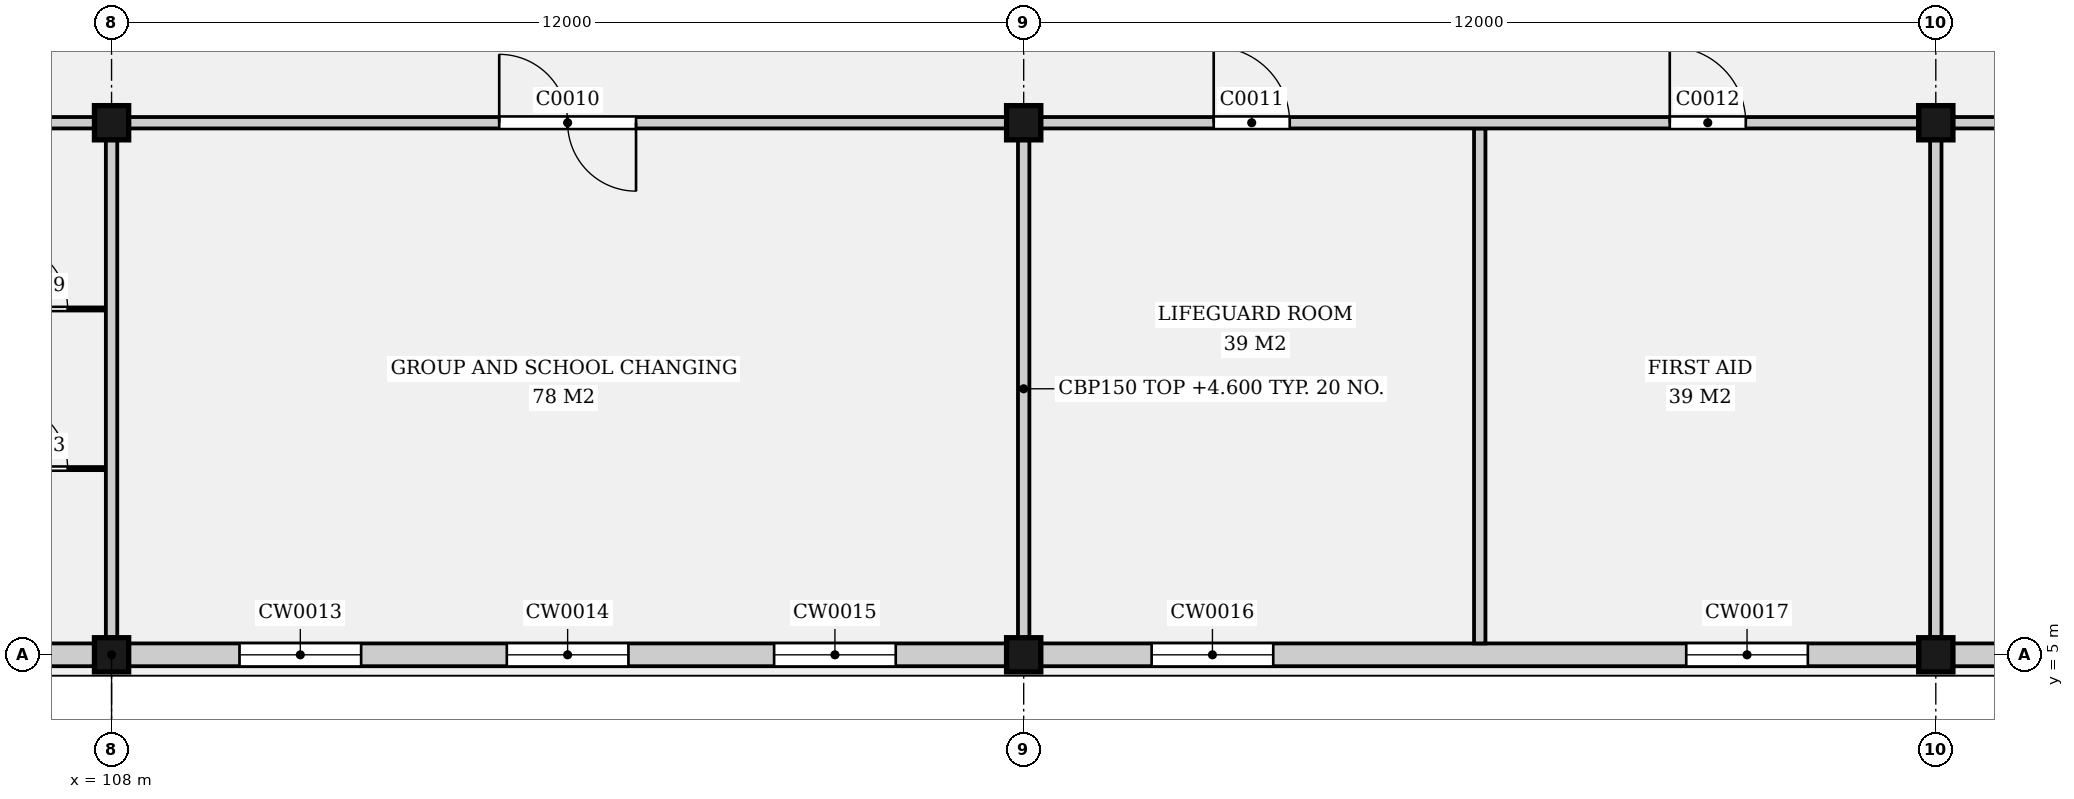
"""IFC4 building model, lengths in metres.
Left out: names, types, materials, properties, quantities, classifications, styles, units other than length and angle.
Written with IfcOpenShell. Run it as: python <this file> out.ifc"""

import sys

from ifc_helpers import new_model, si_unit, direction, frame, frame_2d, origin, origin_2d, place, context, subcontext, project, spatial, rectangle, extrude, element, fill, save


model = new_model("IFC4")
c1 = context("Model", 3, precision=1e-05, world=origin(), true_north=direction((0.0, 1.0)))
c2 = subcontext(c1, "Body", "Model", "MODEL_VIEW")
j1 = project(units=[si_unit("LENGTHUNIT", "METRE"), si_unit("PLANEANGLEUNIT", "RADIAN")], contexts=[c1])
p1 = place(None, origin())
s1 = spatial("IfcSite", under=j1, at=p1, CompositionType="ELEMENT")
p2 = place(p1, origin())
s2 = spatial("IfcBuilding", under=s1, at=p2, CompositionType="ELEMENT")
p3 = place(p2, origin())
s3 = spatial("IfcBuildingStorey", under=s2, at=p3, CompositionType="ELEMENT", Elevation=0.0)
for number, where, z_axis, x_axis in (
    (1, (108.0, 5.0, -0.25), (0.0, 0.0, 1.0), (1.0, 0.0, 0.0)),
    (2, (108.0, 12.0, -0.25), (0.0, 0.0, 1.0), (1.0, 0.0, 0.0)),
    (3, (120.0, 5.0, -0.25), (0.0, 0.0, 1.0), (1.0, 0.0, 0.0)),
    (4, (120.0, 12.0, -0.25), (0.0, 0.0, 1.0), (1.0, 0.0, 0.0)),
    (5, (132.0, 5.0, -0.25), (0.0, 0.0, 1.0), (1.0, 0.0, 0.0)),
    (6, (132.0, 12.0, -0.25), (0.0, 0.0, 1.0), (1.0, 0.0, 0.0)),
):
    element("IfcColumn", number, at=place(p3, frame(where, z_axis=z_axis, x_axis=x_axis)), inside=s3, PredefinedType="COLUMN", context=c2, shape_type="SweptSolid", body=[
        extrude(rectangle(XDim=0.45, YDim=0.45, at=origin_2d()), origin(), (0.0, 0.0, 1.0), 5.25),
    ])
p4 = place(p3, frame((96.225, 5.0, 0.0), z_axis=(0.0, 0.0, 1.0), x_axis=(1.0, 0.0, 0.0)))
e7 = element("IfcWall", 7, at=p4, inside=s3, PredefinedType="ELEMENTEDWALL", context=c2, shape_type="SweptSolid", body=[
    extrude(rectangle(XDim=11.55, YDim=0.3, at=frame_2d((5.775, 0.0))), origin(), (0.0, 0.0, 1.0), 4.6),
])
p5 = place(p4, frame((1.458, 0.0, 2.5)))
e8 = element("IfcOpeningElement", 8, at=p5, cuts=e7, PredefinedType="OPENING", context=c2, shape_type="SweptSolid", body=[
    extrude(rectangle(XDim=1.6, YDim=1.0, at=frame_2d((0.8, 0.5))), frame((0.0, 0.16, 0.0), z_axis=(0.0, -1.0, 0.0), x_axis=(1.0, 0.0, 0.0)), (0.0, 0.0, 1.0), 0.32),
])
p6 = place(p4, frame((4.975, 0.0, 2.5)))
e9 = element("IfcOpeningElement", 9, at=p6, cuts=e7, PredefinedType="OPENING", context=c2, shape_type="SweptSolid", body=[
    extrude(rectangle(XDim=1.6, YDim=1.0, at=frame_2d((0.8, 0.5))), frame((0.0, 0.16, 0.0), z_axis=(0.0, -1.0, 0.0), x_axis=(1.0, 0.0, 0.0)), (0.0, 0.0, 1.0), 0.32),
])
p7 = place(p4, frame((8.492, 0.0, 2.5)))
e10 = element("IfcOpeningElement", 10, at=p7, cuts=e7, PredefinedType="OPENING", context=c2, shape_type="SweptSolid", body=[
    extrude(rectangle(XDim=1.6, YDim=1.0, at=frame_2d((0.8, 0.5))), frame((0.0, 0.16, 0.0), z_axis=(0.0, -1.0, 0.0), x_axis=(1.0, 0.0, 0.0)), (0.0, 0.0, 1.0), 0.32),
])
p8 = place(p3, frame((108.225, 5.0, 0.0), z_axis=(0.0, 0.0, 1.0), x_axis=(1.0, 0.0, 0.0)))
e11 = element("IfcWall", 11, at=p8, inside=s3, PredefinedType="ELEMENTEDWALL", context=c2, shape_type="SweptSolid", body=[
    extrude(rectangle(XDim=11.55, YDim=0.3, at=frame_2d((5.775, 0.0))), origin(), (0.0, 0.0, 1.0), 4.6),
])
p9 = place(p8, frame((1.458, 0.0, 2.5)))
e12 = element("IfcOpeningElement", 12, at=p9, cuts=e11, PredefinedType="OPENING", context=c2, shape_type="SweptSolid", body=[
    extrude(rectangle(XDim=1.6, YDim=1.0, at=frame_2d((0.8, 0.5))), frame((0.0, 0.16, 0.0), z_axis=(0.0, -1.0, 0.0), x_axis=(1.0, 0.0, 0.0)), (0.0, 0.0, 1.0), 0.32),
])
p10 = place(p8, frame((4.975, 0.0, 2.5)))
e13 = element("IfcOpeningElement", 13, at=p10, cuts=e11, PredefinedType="OPENING", context=c2, shape_type="SweptSolid", body=[
    extrude(rectangle(XDim=1.6, YDim=1.0, at=frame_2d((0.8, 0.5))), frame((0.0, 0.16, 0.0), z_axis=(0.0, -1.0, 0.0), x_axis=(1.0, 0.0, 0.0)), (0.0, 0.0, 1.0), 0.32),
])
p11 = place(p8, frame((8.492, 0.0, 2.5)))
e14 = element("IfcOpeningElement", 14, at=p11, cuts=e11, PredefinedType="OPENING", context=c2, shape_type="SweptSolid", body=[
    extrude(rectangle(XDim=1.6, YDim=1.0, at=frame_2d((0.8, 0.5))), frame((0.0, 0.16, 0.0), z_axis=(0.0, -1.0, 0.0), x_axis=(1.0, 0.0, 0.0)), (0.0, 0.0, 1.0), 0.32),
])
p12 = place(p3, frame((120.225, 5.0, 0.0), z_axis=(0.0, 0.0, 1.0), x_axis=(1.0, 0.0, 0.0)))
e15 = element("IfcWall", 15, at=p12, inside=s3, PredefinedType="ELEMENTEDWALL", context=c2, shape_type="SweptSolid", body=[
    extrude(rectangle(XDim=11.55, YDim=0.3, at=frame_2d((5.775, 0.0))), origin(), (0.0, 0.0, 1.0), 4.6),
])
p13 = place(p12, frame((1.458, 0.0, 2.5)))
e16 = element("IfcOpeningElement", 16, at=p13, cuts=e15, PredefinedType="OPENING", context=c2, shape_type="SweptSolid", body=[
    extrude(rectangle(XDim=1.6, YDim=1.0, at=frame_2d((0.8, 0.5))), frame((0.0, 0.16, 0.0), z_axis=(0.0, -1.0, 0.0), x_axis=(1.0, 0.0, 0.0)), (0.0, 0.0, 1.0), 0.32),
])
p14 = place(p12, frame((8.492, 0.0, 2.5)))
e17 = element("IfcOpeningElement", 17, at=p14, cuts=e15, PredefinedType="OPENING", context=c2, shape_type="SweptSolid", body=[
    extrude(rectangle(XDim=1.6, YDim=1.0, at=frame_2d((0.8, 0.5))), frame((0.0, 0.16, 0.0), z_axis=(0.0, -1.0, 0.0), x_axis=(1.0, 0.0, 0.0)), (0.0, 0.0, 1.0), 0.32),
])
p15 = place(p3, frame((132.225, 5.0, 0.0), z_axis=(0.0, 0.0, 1.0), x_axis=(1.0, 0.0, 0.0)))
e18 = element("IfcWall", 18, at=p15, inside=s3, PredefinedType="ELEMENTEDWALL", context=c2, shape_type="SweptSolid", body=[
    extrude(rectangle(XDim=11.55, YDim=0.3, at=frame_2d((5.775, 0.0))), origin(), (0.0, 0.0, 1.0), 4.6),
])
p16 = place(p15, frame((1.458, 0.0, 2.5)))
e19 = element("IfcOpeningElement", 19, at=p16, cuts=e18, PredefinedType="OPENING", context=c2, shape_type="SweptSolid", body=[
    extrude(rectangle(XDim=1.6, YDim=1.0, at=frame_2d((0.8, 0.5))), frame((0.0, 0.16, 0.0), z_axis=(0.0, -1.0, 0.0), x_axis=(1.0, 0.0, 0.0)), (0.0, 0.0, 1.0), 0.32),
])
p17 = place(p15, frame((4.975, 0.0, 2.5)))
e20 = element("IfcOpeningElement", 20, at=p17, cuts=e18, PredefinedType="OPENING", context=c2, shape_type="SweptSolid", body=[
    extrude(rectangle(XDim=1.6, YDim=1.0, at=frame_2d((0.8, 0.5))), frame((0.0, 0.16, 0.0), z_axis=(0.0, -1.0, 0.0), x_axis=(1.0, 0.0, 0.0)), (0.0, 0.0, 1.0), 0.32),
])
p18 = place(p15, frame((8.492, 0.0, 2.5)))
e21 = element("IfcOpeningElement", 21, at=p18, cuts=e18, PredefinedType="OPENING", context=c2, shape_type="SweptSolid", body=[
    extrude(rectangle(XDim=1.6, YDim=1.0, at=frame_2d((0.8, 0.5))), frame((0.0, 0.16, 0.0), z_axis=(0.0, -1.0, 0.0), x_axis=(1.0, 0.0, 0.0)), (0.0, 0.0, 1.0), 0.32),
])
p19 = place(p3, frame((96.225, 12.0, 0.0), z_axis=(0.0, 0.0, 1.0), x_axis=(1.0, 0.0, 0.0)))
e22 = element("IfcWall", 22, at=p19, inside=s3, PredefinedType="PARTITIONING", context=c2, shape_type="SweptSolid", body=[
    extrude(rectangle(XDim=11.55, YDim=0.15, at=frame_2d((5.775, 0.0))), origin(), (0.0, 0.0, 1.0), 4.6),
])
p20 = place(p19, frame((4.875, 0.0, 0.0)))
e23 = element("IfcOpeningElement", 23, at=p20, cuts=e22, PredefinedType="OPENING", context=c2, shape_type="SweptSolid", body=[
    extrude(rectangle(XDim=1.8, YDim=2.4, at=frame_2d((0.9, 1.2))), frame((0.0, 0.085, 0.0), z_axis=(0.0, -1.0, 0.0), x_axis=(1.0, 0.0, 0.0)), (0.0, 0.0, 1.0), 0.17),
])
p21 = place(p3, frame((108.225, 12.0, 0.0), z_axis=(0.0, 0.0, 1.0), x_axis=(1.0, 0.0, 0.0)))
e24 = element("IfcWall", 24, at=p21, inside=s3, PredefinedType="PARTITIONING", context=c2, shape_type="SweptSolid", body=[
    extrude(rectangle(XDim=11.55, YDim=0.15, at=frame_2d((5.775, 0.0))), origin(), (0.0, 0.0, 1.0), 4.6),
])
p22 = place(p21, frame((4.875, 0.0, 0.0)))
e25 = element("IfcOpeningElement", 25, at=p22, cuts=e24, PredefinedType="OPENING", context=c2, shape_type="SweptSolid", body=[
    extrude(rectangle(XDim=1.8, YDim=2.4, at=frame_2d((0.9, 1.2))), frame((0.0, 0.085, 0.0), z_axis=(0.0, -1.0, 0.0), x_axis=(1.0, 0.0, 0.0)), (0.0, 0.0, 1.0), 0.17),
])
p23 = place(p3, frame((120.225, 12.0, 0.0), z_axis=(0.0, 0.0, 1.0), x_axis=(1.0, 0.0, 0.0)))
e26 = element("IfcWall", 26, at=p23, inside=s3, PredefinedType="PARTITIONING", context=c2, shape_type="SweptSolid", body=[
    extrude(rectangle(XDim=11.55, YDim=0.15, at=frame_2d((5.775, 0.0))), origin(), (0.0, 0.0, 1.0), 4.6),
])
p24 = place(p23, frame((2.275, 0.0, 0.0)))
e27 = element("IfcOpeningElement", 27, at=p24, cuts=e26, PredefinedType="OPENING", context=c2, shape_type="SweptSolid", body=[
    extrude(rectangle(XDim=1.0, YDim=2.1, at=frame_2d((0.5, 1.05))), frame((0.0, 0.085, 0.0), z_axis=(0.0, -1.0, 0.0), x_axis=(1.0, 0.0, 0.0)), (0.0, 0.0, 1.0), 0.17),
])
p25 = place(p23, frame((8.275, 0.0, 0.0)))
e28 = element("IfcOpeningElement", 28, at=p25, cuts=e26, PredefinedType="OPENING", context=c2, shape_type="SweptSolid", body=[
    extrude(rectangle(XDim=1.0, YDim=2.1, at=frame_2d((0.5, 1.05))), frame((0.0, 0.085, 0.0), z_axis=(0.0, -1.0, 0.0), x_axis=(1.0, 0.0, 0.0)), (0.0, 0.0, 1.0), 0.17),
])
p26 = place(p3, frame((132.225, 12.0, 0.0), z_axis=(0.0, 0.0, 1.0), x_axis=(1.0, 0.0, 0.0)))
e29 = element("IfcWall", 29, at=p26, inside=s3, PredefinedType="PARTITIONING", context=c2, shape_type="SweptSolid", body=[
    extrude(rectangle(XDim=11.55, YDim=0.15, at=frame_2d((5.775, 0.0))), origin(), (0.0, 0.0, 1.0), 4.6),
])
p27 = place(p26, frame((4.875, 0.0, 0.0)))
e30 = element("IfcOpeningElement", 30, at=p27, cuts=e29, PredefinedType="OPENING", context=c2, shape_type="SweptSolid", body=[
    extrude(rectangle(XDim=1.8, YDim=2.4, at=frame_2d((0.9, 1.2))), frame((0.0, 0.085, 0.0), z_axis=(0.0, -1.0, 0.0), x_axis=(1.0, 0.0, 0.0)), (0.0, 0.0, 1.0), 0.17),
])
for number, where, z_axis, x_axis in (
    (31, (108.0, 5.225, 0.0), (0.0, 0.0, 1.0), (0.0, 1.0, 0.0)),
    (32, (120.0, 5.225, 0.0), (0.0, 0.0, 1.0), (0.0, 1.0, 0.0)),
):
    element("IfcWall", number, at=place(p3, frame(where, z_axis=z_axis, x_axis=x_axis)), inside=s3, PredefinedType="PARTITIONING", context=c2, shape_type="SweptSolid", body=[
        extrude(rectangle(XDim=6.55, YDim=0.15, at=frame_2d((3.275, 0.0))), origin(), (0.0, 0.0, 1.0), 4.6),
    ])
p28 = place(p3, frame((126.0, 5.15, 0.0), z_axis=(0.0, 0.0, 1.0), x_axis=(0.0, 1.0, 0.0)))
e33 = element("IfcWall", 33, at=p28, inside=s3, PredefinedType="PARTITIONING", context=c2, shape_type="SweptSolid", body=[
    extrude(rectangle(XDim=6.775, YDim=0.15, at=frame_2d((3.388, 0.0))), origin(), (0.0, 0.0, 1.0), 4.6),
])
p29 = place(p3, frame((132.0, 5.225, 0.0), z_axis=(0.0, 0.0, 1.0), x_axis=(0.0, 1.0, 0.0)))
e34 = element("IfcWall", 34, at=p29, inside=s3, PredefinedType="PARTITIONING", context=c2, shape_type="SweptSolid", body=[
    extrude(rectangle(XDim=6.55, YDim=0.15, at=frame_2d((3.275, 0.0))), origin(), (0.0, 0.0, 1.0), 4.6),
])
p30 = place(p3, frame((106.02, 7.45, 0.0), z_axis=(0.0, 0.0, 1.0), x_axis=(1.0, 0.0, 0.0)))
e35 = element("IfcWall", 35, at=p30, inside=s3, PredefinedType="PARTITIONING", context=c2, shape_type="SweptSolid", body=[
    extrude(rectangle(XDim=1.905, YDim=0.04, at=frame_2d((0.953, 0.0))), origin(), (0.0, 0.0, 1.0), 2.5),
])
p31 = place(p30, frame((0.502, 0.0, 0.0)))
e36 = element("IfcOpeningElement", 36, at=p31, cuts=e35, PredefinedType="OPENING", context=c2, shape_type="SweptSolid", body=[
    extrude(rectangle(XDim=0.9, YDim=2.0, at=frame_2d((0.45, 1.0))), frame((0.0, 0.03, 0.0), z_axis=(0.0, -1.0, 0.0), x_axis=(1.0, 0.0, 0.0)), (0.0, 0.0, 1.0), 0.06),
])
p32 = place(p3, frame((106.02, 9.55, 0.0), z_axis=(0.0, 0.0, 1.0), x_axis=(1.0, 0.0, 0.0)))
e37 = element("IfcWall", 37, at=p32, inside=s3, PredefinedType="PARTITIONING", context=c2, shape_type="SweptSolid", body=[
    extrude(rectangle(XDim=1.905, YDim=0.04, at=frame_2d((0.953, 0.0))), origin(), (0.0, 0.0, 1.0), 2.5),
])
p33 = place(p32, frame((0.502, 0.0, 0.0)))
e38 = element("IfcOpeningElement", 38, at=p33, cuts=e37, PredefinedType="OPENING", context=c2, shape_type="SweptSolid", body=[
    extrude(rectangle(XDim=0.9, YDim=2.0, at=frame_2d((0.45, 1.0))), frame((0.0, 0.03, 0.0), z_axis=(0.0, -1.0, 0.0), x_axis=(1.0, 0.0, 0.0)), (0.0, 0.0, 1.0), 0.06),
])
p34 = place(p9, origin())
e39 = element("IfcWindow", 39, at=p34, inside=s3, PartitioningType="SINGLE_PANEL", PredefinedType="WINDOW", context=c2, shape_type="SweptSolid", body=[
    extrude(rectangle(XDim=1.6, YDim=1.0, at=frame_2d((0.8, 0.5))), frame((0.0, 0.03, 0.0), z_axis=(0.0, -1.0, 0.0), x_axis=(1.0, 0.0, 0.0)), (0.0, 0.0, 1.0), 0.06),
])
fill(e12, e39)
p35 = place(p10, origin())
e40 = element("IfcWindow", 40, at=p35, inside=s3, PartitioningType="SINGLE_PANEL", PredefinedType="WINDOW", context=c2, shape_type="SweptSolid", body=[
    extrude(rectangle(XDim=1.6, YDim=1.0, at=frame_2d((0.8, 0.5))), frame((0.0, 0.03, 0.0), z_axis=(0.0, -1.0, 0.0), x_axis=(1.0, 0.0, 0.0)), (0.0, 0.0, 1.0), 0.06),
])
fill(e13, e40)
p36 = place(p11, origin())
e41 = element("IfcWindow", 41, at=p36, inside=s3, PartitioningType="SINGLE_PANEL", PredefinedType="WINDOW", context=c2, shape_type="SweptSolid", body=[
    extrude(rectangle(XDim=1.6, YDim=1.0, at=frame_2d((0.8, 0.5))), frame((0.0, 0.03, 0.0), z_axis=(0.0, -1.0, 0.0), x_axis=(1.0, 0.0, 0.0)), (0.0, 0.0, 1.0), 0.06),
])
fill(e14, e41)
p37 = place(p13, origin())
e42 = element("IfcWindow", 42, at=p37, inside=s3, PartitioningType="SINGLE_PANEL", PredefinedType="WINDOW", context=c2, shape_type="SweptSolid", body=[
    extrude(rectangle(XDim=1.6, YDim=1.0, at=frame_2d((0.8, 0.5))), frame((0.0, 0.03, 0.0), z_axis=(0.0, -1.0, 0.0), x_axis=(1.0, 0.0, 0.0)), (0.0, 0.0, 1.0), 0.06),
])
fill(e16, e42)
p38 = place(p14, origin())
e43 = element("IfcWindow", 43, at=p38, inside=s3, PartitioningType="SINGLE_PANEL", PredefinedType="WINDOW", context=c2, shape_type="SweptSolid", body=[
    extrude(rectangle(XDim=1.6, YDim=1.0, at=frame_2d((0.8, 0.5))), frame((0.0, 0.03, 0.0), z_axis=(0.0, -1.0, 0.0), x_axis=(1.0, 0.0, 0.0)), (0.0, 0.0, 1.0), 0.06),
])
fill(e17, e43)
p39 = place(p22, origin())
e44 = element("IfcDoor", 44, at=p39, inside=s3, OperationType="DOUBLE_DOOR_SINGLE_SWING", PredefinedType="DOOR", context=c2, shape_type="SweptSolid", body=[
    extrude(rectangle(XDim=1.8, YDim=2.4, at=frame_2d((0.9, 1.2))), frame((0.0, 0.025, 0.0), z_axis=(0.0, -1.0, 0.0), x_axis=(1.0, 0.0, 0.0)), (0.0, 0.0, 1.0), 0.05),
])
fill(e25, e44)
p40 = place(p24, origin())
e45 = element("IfcDoor", 45, at=p40, inside=s3, OperationType="SINGLE_SWING_LEFT", PredefinedType="DOOR", context=c2, shape_type="SweptSolid", body=[
    extrude(rectangle(XDim=1.0, YDim=2.1, at=frame_2d((0.5, 1.05))), frame((0.0, 0.025, 0.0), z_axis=(0.0, -1.0, 0.0), x_axis=(1.0, 0.0, 0.0)), (0.0, 0.0, 1.0), 0.05),
])
fill(e27, e45)
p41 = place(p25, origin())
e46 = element("IfcDoor", 46, at=p41, inside=s3, OperationType="SINGLE_SWING_LEFT", PredefinedType="DOOR", context=c2, shape_type="SweptSolid", body=[
    extrude(rectangle(XDim=1.0, YDim=2.1, at=frame_2d((0.5, 1.05))), frame((0.0, 0.025, 0.0), z_axis=(0.0, -1.0, 0.0), x_axis=(1.0, 0.0, 0.0)), (0.0, 0.0, 1.0), 0.05),
])
fill(e28, e46)
p42 = place(p31, origin())
e47 = element("IfcDoor", 47, at=p42, inside=s3, OperationType="SINGLE_SWING_LEFT", PredefinedType="DOOR", context=c2, shape_type="SweptSolid", body=[
    extrude(rectangle(XDim=0.9, YDim=2.0, at=frame_2d((0.45, 1.0))), frame((0.0, 0.02, 0.0), z_axis=(0.0, -1.0, 0.0), x_axis=(1.0, 0.0, 0.0)), (0.0, 0.0, 1.0), 0.04),
])
fill(e36, e47)
p43 = place(p33, origin())
e48 = element("IfcDoor", 48, at=p43, inside=s3, OperationType="SINGLE_SWING_LEFT", PredefinedType="DOOR", context=c2, shape_type="SweptSolid", body=[
    extrude(rectangle(XDim=0.9, YDim=2.0, at=frame_2d((0.45, 1.0))), frame((0.0, 0.02, 0.0), z_axis=(0.0, -1.0, 0.0), x_axis=(1.0, 0.0, 0.0)), (0.0, 0.0, 1.0), 0.04),
])
fill(e38, e48)
save(model, sys.argv[1])
